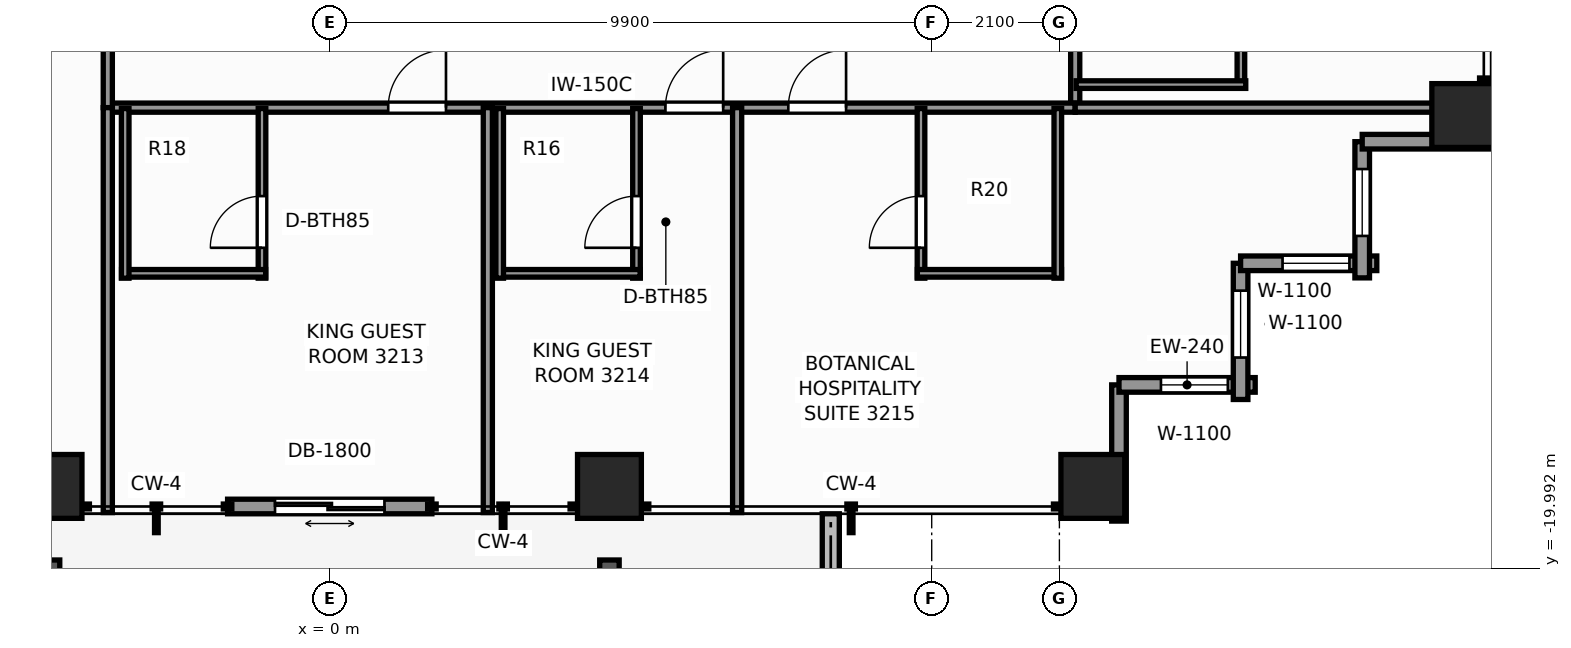
"""IFC4 building model, lengths in metres.
Left out: names, types, materials, properties, quantities, classifications, styles, units other than length and angle.
Written with IfcOpenShell. Run it as: python <this file> out.ifc"""

import sys

from ifc_helpers import new_model, si_unit, direction, frame, frame_2d, origin, origin_2d, place, context, subcontext, project, spatial, rectangle, extrude, element, fill, save


model = new_model("IFC4")
c1 = context("Model", 3, precision=1e-05, world=origin(), true_north=direction((0.0, 1.0)))
c2 = subcontext(c1, "Body", "Model", "MODEL_VIEW")
j1 = project(units=[si_unit("LENGTHUNIT", "METRE"), si_unit("PLANEANGLEUNIT", "RADIAN")], contexts=[c1])
p1 = place(None, origin())
s1 = spatial("IfcSite", under=j1, at=p1, CompositionType="ELEMENT")
p2 = place(p1, origin())
s2 = spatial("IfcBuilding", under=s1, at=p2, CompositionType="ELEMENT")
p3 = place(p2, frame((0.0, 0.0, 111.8)))
s3 = spatial("IfcBuildingStorey", under=s2, at=p3, CompositionType="ELEMENT", Elevation=111.8)
for number, where, z_axis, x_axis in (
    (1, (-4.6, -18.65, 0.0), (0.0, 0.0, 1.0), (1.0, 0.0, 0.0)),
    (2, (4.6, -18.65, 0.0), (0.0, 0.0, 1.0), (1.0, 0.0, 0.0)),
    (3, (12.55, -18.65, 0.0), (0.0, 0.0, 1.0), (1.0, 0.0, 0.0)),
    (4, (18.65, -12.55, 0.0), (0.0, 0.0, 1.0), (1.0, 0.0, 0.0)),
):
    element("IfcColumn", number, at=place(p3, frame(where, z_axis=z_axis, x_axis=x_axis)), inside=s3, PredefinedType="COLUMN", context=c2, shape_type="SweptSolid", body=[
        extrude(rectangle(XDim=1.05, YDim=1.05, at=origin_2d()), origin(), (0.0, 0.0, 1.0), 3.3),
    ])
p4 = place(p3, frame((8.24, -21.774, -0.04), z_axis=(0.0, 0.0, 1.0), x_axis=(0.0, 1.0, 0.0)))
e5 = element("IfcWall", 5, at=p4, inside=s3, PredefinedType="PARAPET", context=c2, shape_type="SweptSolid", body=[
    extrude(rectangle(XDim=2.674, YDim=0.28, at=frame_2d((1.337, 0.0))), origin(), (0.0, 0.0, 1.0), 0.42),
])
p5 = place(p3, frame((1.68, -18.98, 0.0), z_axis=(0.0, 0.0, 1.0), x_axis=(-1.0, 0.0, 0.0)))
e6 = element("IfcWall", 6, at=p5, inside=s3, PredefinedType="STANDARD", context=c2, shape_type="SweptSolid", body=[
    extrude(rectangle(XDim=3.36, YDim=0.24, at=frame_2d((1.68, 0.0))), origin(), (0.0, 0.0, 1.0), 3.08),
])
p6 = place(p5, frame((0.78, 0.0, 0.0)))
e7 = element("IfcOpeningElement", 7, at=p6, cuts=e6, PredefinedType="OPENING", context=c2, shape_type="SweptSolid", body=[
    extrude(rectangle(XDim=1.8, YDim=2.2, at=frame_2d((0.9, 1.1))), frame((0.0, 0.13, 0.0), z_axis=(0.0, -1.0, 0.0), x_axis=(1.0, 0.0, 0.0)), (0.0, 0.0, 1.0), 0.26),
])
p7 = place(p3, frame((12.98, -16.98, 0.0), z_axis=(0.0, 0.0, 1.0), x_axis=(0.0, -1.0, 0.0)))
e8 = element("IfcWall", 8, at=p7, inside=s3, PredefinedType="STANDARD", context=c2, shape_type="SweptSolid", body=[
    extrude(rectangle(XDim=2.24, YDim=0.24, at=frame_2d((1.12, 0.0))), origin(), (0.0, 0.0, 1.0), 2.459),
])
p8 = place(p3, frame((15.22, -16.98, 0.0), z_axis=(0.0, 0.0, 1.0), x_axis=(-1.0, 0.0, 0.0)))
e9 = element("IfcWall", 9, at=p8, inside=s3, PredefinedType="STANDARD", context=c2, shape_type="SweptSolid", body=[
    extrude(rectangle(XDim=2.24, YDim=0.24, at=frame_2d((1.12, 0.0))), origin(), (0.0, 0.0, 1.0), 2.459),
])
p9 = place(p8, frame((0.45, 0.0, 0.65)))
e10 = element("IfcOpeningElement", 10, at=p9, cuts=e9, PredefinedType="OPENING", context=c2, shape_type="SweptSolid", body=[
    extrude(rectangle(XDim=1.1, YDim=1.45, at=frame_2d((0.55, 0.725))), frame((0.0, 0.13, 0.0), z_axis=(0.0, -1.0, 0.0), x_axis=(1.0, 0.0, 0.0)), (0.0, 0.0, 1.0), 0.26),
])
p10 = place(p3, frame((14.98, -14.98, 0.0), z_axis=(0.0, 0.0, 1.0), x_axis=(0.0, -1.0, 0.0)))
e11 = element("IfcWall", 11, at=p10, inside=s3, PredefinedType="STANDARD", context=c2, shape_type="SweptSolid", body=[
    extrude(rectangle(XDim=2.24, YDim=0.24, at=frame_2d((1.12, 0.0))), origin(), (0.0, 0.0, 1.0), 2.459),
])
p11 = place(p10, frame((0.45, 0.0, 0.65)))
e12 = element("IfcOpeningElement", 12, at=p11, cuts=e11, PredefinedType="OPENING", context=c2, shape_type="SweptSolid", body=[
    extrude(rectangle(XDim=1.1, YDim=1.45, at=frame_2d((0.55, 0.725))), frame((0.0, 0.13, 0.0), z_axis=(0.0, -1.0, 0.0), x_axis=(1.0, 0.0, 0.0)), (0.0, 0.0, 1.0), 0.26),
])
p12 = place(p3, frame((17.22, -14.98, 0.0), z_axis=(0.0, 0.0, 1.0), x_axis=(-1.0, 0.0, 0.0)))
e13 = element("IfcWall", 13, at=p12, inside=s3, PredefinedType="STANDARD", context=c2, shape_type="SweptSolid", body=[
    extrude(rectangle(XDim=2.24, YDim=0.24, at=frame_2d((1.12, 0.0))), origin(), (0.0, 0.0, 1.0), 2.459),
])
p13 = place(p12, frame((0.45, 0.0, 0.65)))
e14 = element("IfcOpeningElement", 14, at=p13, cuts=e13, PredefinedType="OPENING", context=c2, shape_type="SweptSolid", body=[
    extrude(rectangle(XDim=1.1, YDim=1.45, at=frame_2d((0.55, 0.725))), frame((0.0, 0.13, 0.0), z_axis=(0.0, -1.0, 0.0), x_axis=(1.0, 0.0, 0.0)), (0.0, 0.0, 1.0), 0.26),
])
p14 = place(p3, frame((16.98, -12.98, 0.0), z_axis=(0.0, 0.0, 1.0), x_axis=(0.0, -1.0, 0.0)))
e15 = element("IfcWall", 15, at=p14, inside=s3, PredefinedType="STANDARD", context=c2, shape_type="SweptSolid", body=[
    extrude(rectangle(XDim=2.24, YDim=0.24, at=frame_2d((1.12, 0.0))), origin(), (0.0, 0.0, 1.0), 2.459),
])
p15 = place(p14, frame((0.45, 0.0, 0.65)))
e16 = element("IfcOpeningElement", 16, at=p15, cuts=e15, PredefinedType="OPENING", context=c2, shape_type="SweptSolid", body=[
    extrude(rectangle(XDim=1.1, YDim=1.45, at=frame_2d((0.55, 0.725))), frame((0.0, 0.13, 0.0), z_axis=(0.0, -1.0, 0.0), x_axis=(1.0, 0.0, 0.0)), (0.0, 0.0, 1.0), 0.26),
])
p16 = place(p3, frame((19.22, -12.98, 0.0), z_axis=(0.0, 0.0, 1.0), x_axis=(-1.0, 0.0, 0.0)))
e17 = element("IfcWall", 17, at=p16, inside=s3, PredefinedType="STANDARD", context=c2, shape_type="SweptSolid", body=[
    extrude(rectangle(XDim=2.24, YDim=0.24, at=frame_2d((1.12, 0.0))), origin(), (0.0, 0.0, 1.0), 2.459),
])
p17 = place(p3, frame((12.26, -12.42, 0.0), z_axis=(0.0, 0.0, 1.0), x_axis=(0.0, 1.0, 0.0)))
e18 = element("IfcWall", 18, at=p17, inside=s3, PredefinedType="PARTITIONING", context=c2, shape_type="SweptSolid", body=[
    extrude(rectangle(XDim=24.84, YDim=0.15, at=frame_2d((12.42, 0.0))), origin(), (0.0, 0.0, 1.0), 2.292),
])
p18 = place(p17, frame((3.373, 0.0, 0.0)))
e19 = element("IfcOpeningElement", 19, at=p18, cuts=e18, PredefinedType="OPENING", context=c2, shape_type="SweptSolid", body=[
    extrude(rectangle(XDim=0.95, YDim=2.06, at=frame_2d((0.475, 1.03))), frame((0.0, 0.085, 0.0), z_axis=(0.0, -1.0, 0.0), x_axis=(1.0, 0.0, 0.0)), (0.0, 0.0, 1.0), 0.17),
])
p19 = place(p17, frame((5.593, 0.0, 0.0)))
e20 = element("IfcOpeningElement", 20, at=p19, cuts=e18, PredefinedType="OPENING", context=c2, shape_type="SweptSolid", body=[
    extrude(rectangle(XDim=0.95, YDim=2.06, at=frame_2d((0.475, 1.03))), frame((0.0, 0.085, 0.0), z_axis=(0.0, -1.0, 0.0), x_axis=(1.0, 0.0, 0.0)), (0.0, 0.0, 1.0), 0.17),
])
p20 = place(p17, frame((13.981, 0.0, 0.0)))
e21 = element("IfcOpeningElement", 21, at=p20, cuts=e18, PredefinedType="OPENING", context=c2, shape_type="SweptSolid", body=[
    extrude(rectangle(XDim=0.95, YDim=2.06, at=frame_2d((0.475, 1.03))), frame((0.0, 0.085, 0.0), z_axis=(0.0, -1.0, 0.0), x_axis=(1.0, 0.0, 0.0)), (0.0, 0.0, 1.0), 0.17),
])
p21 = place(p17, frame((16.886, 0.0, 0.0)))
e22 = element("IfcOpeningElement", 22, at=p21, cuts=e18, PredefinedType="OPENING", context=c2, shape_type="SweptSolid", body=[
    extrude(rectangle(XDim=0.9, YDim=2.06, at=frame_2d((0.45, 1.03))), frame((0.0, 0.085, 0.0), z_axis=(0.0, -1.0, 0.0), x_axis=(1.0, 0.0, 0.0)), (0.0, 0.0, 1.0), 0.17),
])
p22 = place(p17, frame((20.0, 0.0, 0.0)))
e23 = element("IfcOpeningElement", 23, at=p22, cuts=e18, PredefinedType="OPENING", context=c2, shape_type="SweptSolid", body=[
    extrude(rectangle(XDim=0.95, YDim=2.06, at=frame_2d((0.475, 1.03))), frame((0.0, 0.085, 0.0), z_axis=(0.0, -1.0, 0.0), x_axis=(1.0, 0.0, 0.0)), (0.0, 0.0, 1.0), 0.17),
])
p23 = place(p3, frame((-3.65, -12.42, 0.0), z_axis=(0.0, 0.0, 1.0), x_axis=(1.0, 0.0, 0.0)))
e24 = element("IfcWall", 24, at=p23, inside=s3, PredefinedType="PARTITIONING", context=c2, shape_type="SweptSolid", body=[
    extrude(rectangle(XDim=15.91, YDim=0.15, at=frame_2d((7.955, 0.0))), origin(), (0.0, 0.0, 1.0), 2.292),
])
p24 = place(p23, frame((4.612, 0.0, 0.0)))
e25 = element("IfcOpeningElement", 25, at=p24, cuts=e24, PredefinedType="OPENING", context=c2, shape_type="SweptSolid", body=[
    extrude(rectangle(XDim=0.95, YDim=2.06, at=frame_2d((0.475, 1.03))), frame((0.0, 0.085, 0.0), z_axis=(0.0, -1.0, 0.0), x_axis=(1.0, 0.0, 0.0)), (0.0, 0.0, 1.0), 0.17),
])
p25 = place(p23, frame((9.17, 0.0, 0.0)))
e26 = element("IfcOpeningElement", 26, at=p25, cuts=e24, PredefinedType="OPENING", context=c2, shape_type="SweptSolid", body=[
    extrude(rectangle(XDim=0.95, YDim=2.06, at=frame_2d((0.475, 1.03))), frame((0.0, 0.085, 0.0), z_axis=(0.0, -1.0, 0.0), x_axis=(1.0, 0.0, 0.0)), (0.0, 0.0, 1.0), 0.17),
])
p26 = place(p23, frame((11.192, 0.0, 0.0)))
e27 = element("IfcOpeningElement", 27, at=p26, cuts=e24, PredefinedType="OPENING", context=c2, shape_type="SweptSolid", body=[
    extrude(rectangle(XDim=0.95, YDim=2.06, at=frame_2d((0.475, 1.03))), frame((0.0, 0.085, 0.0), z_axis=(0.0, -1.0, 0.0), x_axis=(1.0, 0.0, 0.0)), (0.0, 0.0, 1.0), 0.17),
])
p27 = place(p3, frame((-3.65, -12.42, 0.0), z_axis=(0.0, 0.0, 1.0), x_axis=(0.0, 1.0, 0.0)))
e28 = element("IfcWall", 28, at=p27, inside=s3, PredefinedType="PARTITIONING", context=c2, shape_type="SweptSolid", body=[
    extrude(rectangle(XDim=2.52, YDim=0.15, at=frame_2d((1.26, 0.0))), origin(), (0.0, 0.0, 1.0), 3.08),
])
p28 = place(p3, frame((12.26, -12.42, 0.0), z_axis=(0.0, 0.0, 1.0), x_axis=(1.0, 0.0, 0.0)))
e29 = element("IfcWall", 29, at=p28, inside=s3, PredefinedType="PARTITIONING", context=c2, shape_type="SweptSolid", body=[
    extrude(rectangle(XDim=6.82, YDim=0.15, at=frame_2d((3.41, 0.0))), origin(), (0.0, 0.0, 1.0), 2.292),
])
p29 = place(p3, frame((14.985, -12.101, 0.0), z_axis=(0.0, 0.0, 1.0), x_axis=(0.0, 1.0, 0.0)))
e30 = element("IfcWall", 30, at=p29, inside=s3, PredefinedType="PARTITIONING", context=c2, shape_type="SweptSolid", body=[
    extrude(rectangle(XDim=2.37, YDim=0.125, at=frame_2d((1.185, 0.0))), origin(), (0.0, 0.0, 1.0), 2.292),
])
p30 = place(p3, frame((12.275, -12.041, 0.0), z_axis=(0.0, 0.0, 1.0), x_axis=(1.0, 0.0, 0.0)))
e31 = element("IfcWall", 31, at=p30, inside=s3, PredefinedType="PARTITIONING", context=c2, shape_type="SweptSolid", body=[
    extrude(rectangle(XDim=2.79, YDim=0.125, at=frame_2d((1.395, 0.0))), origin(), (0.0, 0.0, 1.0), 3.08),
])
for number, where, z_axis, x_axis in (
    (32, (-3.65, -19.08, 0.0), (0.0, 0.0, 1.0), (0.0, 1.0, 0.0)),
    (33, (2.6, -19.08, 0.0), (0.0, 0.0, 1.0), (0.0, 1.0, 0.0)),
):
    element("IfcWall", number, at=place(p3, frame(where, z_axis=z_axis, x_axis=x_axis)), inside=s3, PredefinedType="PARTITIONING", context=c2, shape_type="SweptSolid", body=[
        extrude(rectangle(XDim=6.66, YDim=0.15, at=frame_2d((3.33, 0.0))), origin(), (0.0, 0.0, 1.0), 2.449),
    ])
p31 = place(p3, frame((-1.114, -15.225, 0.0), z_axis=(0.0, 0.0, 1.0), x_axis=(0.0, 1.0, 0.0)))
e34 = element("IfcWall", 34, at=p31, inside=s3, PredefinedType="PARTITIONING", context=c2, shape_type="SweptSolid", body=[
    extrude(rectangle(XDim=2.79, YDim=0.125, at=frame_2d((1.395, 0.0))), origin(), (0.0, 0.0, 1.0), 3.08),
])
p32 = place(p31, frame((0.5, 0.0, 0.0)))
e35 = element("IfcOpeningElement", 35, at=p32, cuts=e34, PredefinedType="OPENING", context=c2, shape_type="SweptSolid", body=[
    extrude(rectangle(XDim=0.85, YDim=2.03, at=frame_2d((0.425, 1.015))), frame((0.0, 0.073, 0.0), z_axis=(0.0, -1.0, 0.0), x_axis=(1.0, 0.0, 0.0)), (0.0, 0.0, 1.0), 0.145),
])
p33 = place(p3, frame((-3.424, -15.145, 0.0), z_axis=(0.0, 0.0, 1.0), x_axis=(1.0, 0.0, 0.0)))
e36 = element("IfcWall", 36, at=p33, inside=s3, PredefinedType="PARTITIONING", context=c2, shape_type="SweptSolid", body=[
    extrude(rectangle(XDim=2.37, YDim=0.125, at=frame_2d((1.185, 0.0))), origin(), (0.0, 0.0, 1.0), 3.08),
])
p34 = place(p3, frame((-3.364, -15.225, 0.0), z_axis=(0.0, 0.0, 1.0), x_axis=(0.0, 1.0, 0.0)))
e37 = element("IfcWall", 37, at=p34, inside=s3, PredefinedType="PARTITIONING", context=c2, shape_type="SweptSolid", body=[
    extrude(rectangle(XDim=2.79, YDim=0.125, at=frame_2d((1.395, 0.0))), origin(), (0.0, 0.0, 1.0), 3.08),
])
p35 = place(p3, frame((6.7, -19.08, 0.0), z_axis=(0.0, 0.0, 1.0), x_axis=(0.0, 1.0, 0.0)))
e38 = element("IfcWall", 38, at=p35, inside=s3, PredefinedType="PARTITIONING", context=c2, shape_type="SweptSolid", body=[
    extrude(rectangle(XDim=6.66, YDim=0.15, at=frame_2d((3.33, 0.0))), origin(), (0.0, 0.0, 1.0), 2.449),
])
p36 = place(p3, frame((5.045, -15.225, 0.0), z_axis=(0.0, 0.0, 1.0), x_axis=(0.0, 1.0, 0.0)))
e39 = element("IfcWall", 39, at=p36, inside=s3, PredefinedType="PARTITIONING", context=c2, shape_type="SweptSolid", body=[
    extrude(rectangle(XDim=2.79, YDim=0.125, at=frame_2d((1.395, 0.0))), origin(), (0.0, 0.0, 1.0), 3.08),
])
p37 = place(p36, frame((0.5, 0.0, 0.0)))
e40 = element("IfcOpeningElement", 40, at=p37, cuts=e39, PredefinedType="OPENING", context=c2, shape_type="SweptSolid", body=[
    extrude(rectangle(XDim=0.85, YDim=2.03, at=frame_2d((0.425, 1.015))), frame((0.0, 0.073, 0.0), z_axis=(0.0, -1.0, 0.0), x_axis=(1.0, 0.0, 0.0)), (0.0, 0.0, 1.0), 0.145),
])
p38 = place(p3, frame((2.735, -15.145, 0.0), z_axis=(0.0, 0.0, 1.0), x_axis=(1.0, 0.0, 0.0)))
e41 = element("IfcWall", 41, at=p38, inside=s3, PredefinedType="PARTITIONING", context=c2, shape_type="SweptSolid", body=[
    extrude(rectangle(XDim=2.37, YDim=0.125, at=frame_2d((1.185, 0.0))), origin(), (0.0, 0.0, 1.0), 2.292),
])
p39 = place(p3, frame((2.795, -15.225, 0.0), z_axis=(0.0, 0.0, 1.0), x_axis=(0.0, 1.0, 0.0)))
e42 = element("IfcWall", 42, at=p39, inside=s3, PredefinedType="PARTITIONING", context=c2, shape_type="SweptSolid", body=[
    extrude(rectangle(XDim=2.79, YDim=0.125, at=frame_2d((1.395, 0.0))), origin(), (0.0, 0.0, 1.0), 3.08),
])
p40 = place(p3, frame((9.724, -15.225, 0.0), z_axis=(0.0, 0.0, 1.0), x_axis=(0.0, 1.0, 0.0)))
e43 = element("IfcWall", 43, at=p40, inside=s3, PredefinedType="PARTITIONING", context=c2, shape_type="SweptSolid", body=[
    extrude(rectangle(XDim=2.79, YDim=0.125, at=frame_2d((1.395, 0.0))), origin(), (0.0, 0.0, 1.0), 3.08),
])
p41 = place(p40, frame((0.5, 0.0, 0.0)))
e44 = element("IfcOpeningElement", 44, at=p41, cuts=e43, PredefinedType="OPENING", context=c2, shape_type="SweptSolid", body=[
    extrude(rectangle(XDim=0.85, YDim=2.03, at=frame_2d((0.425, 1.015))), frame((0.0, 0.073, 0.0), z_axis=(0.0, -1.0, 0.0), x_axis=(1.0, 0.0, 0.0)), (0.0, 0.0, 1.0), 0.145),
])
p42 = place(p3, frame((9.664, -15.145, 0.0), z_axis=(0.0, 0.0, 1.0), x_axis=(1.0, 0.0, 0.0)))
e45 = element("IfcWall", 45, at=p42, inside=s3, PredefinedType="PARTITIONING", context=c2, shape_type="SweptSolid", body=[
    extrude(rectangle(XDim=2.37, YDim=0.125, at=frame_2d((1.185, 0.0))), origin(), (0.0, 0.0, 1.0), 2.292),
])
p43 = place(p3, frame((11.974, -15.225, 0.0), z_axis=(0.0, 0.0, 1.0), x_axis=(0.0, 1.0, 0.0)))
e46 = element("IfcWall", 46, at=p43, inside=s3, PredefinedType="PARTITIONING", context=c2, shape_type="SweptSolid", body=[
    extrude(rectangle(XDim=2.79, YDim=0.125, at=frame_2d((1.395, 0.0))), origin(), (0.0, 0.0, 1.0), 3.08),
])
p44 = place(p6, origin())
e47 = element("IfcDoor", 47, at=p44, inside=s3, OperationType="DOUBLE_DOOR_SLIDING", PredefinedType="DOOR", context=c2, shape_type="SweptSolid", body=[
    extrude(rectangle(XDim=1.8, YDim=2.2, at=frame_2d((0.9, 1.1))), frame((0.0, 0.025, 0.0), z_axis=(0.0, -1.0, 0.0), x_axis=(1.0, 0.0, 0.0)), (0.0, 0.0, 1.0), 0.05),
])
fill(e7, e47)
p45 = place(p9, origin())
e48 = element("IfcWindow", 48, at=p45, inside=s3, PartitioningType="SINGLE_PANEL", PredefinedType="WINDOW", context=c2, shape_type="SweptSolid", body=[
    extrude(rectangle(XDim=1.1, YDim=1.45, at=frame_2d((0.55, 0.725))), frame((0.0, 0.03, 0.0), z_axis=(0.0, -1.0, 0.0), x_axis=(1.0, 0.0, 0.0)), (0.0, 0.0, 1.0), 0.06),
])
fill(e10, e48)
p46 = place(p11, origin())
e49 = element("IfcWindow", 49, at=p46, inside=s3, PartitioningType="SINGLE_PANEL", PredefinedType="WINDOW", context=c2, shape_type="SweptSolid", body=[
    extrude(rectangle(XDim=1.1, YDim=1.45, at=frame_2d((0.55, 0.725))), frame((0.0, 0.03, 0.0), z_axis=(0.0, -1.0, 0.0), x_axis=(1.0, 0.0, 0.0)), (0.0, 0.0, 1.0), 0.06),
])
fill(e12, e49)
p47 = place(p13, origin())
e50 = element("IfcWindow", 50, at=p47, inside=s3, PartitioningType="SINGLE_PANEL", PredefinedType="WINDOW", context=c2, shape_type="SweptSolid", body=[
    extrude(rectangle(XDim=1.1, YDim=1.45, at=frame_2d((0.55, 0.725))), frame((0.0, 0.03, 0.0), z_axis=(0.0, -1.0, 0.0), x_axis=(1.0, 0.0, 0.0)), (0.0, 0.0, 1.0), 0.06),
])
fill(e14, e50)
p48 = place(p15, origin())
e51 = element("IfcWindow", 51, at=p48, inside=s3, PartitioningType="SINGLE_PANEL", PredefinedType="WINDOW", context=c2, shape_type="SweptSolid", body=[
    extrude(rectangle(XDim=1.1, YDim=1.45, at=frame_2d((0.55, 0.725))), frame((0.0, 0.03, 0.0), z_axis=(0.0, -1.0, 0.0), x_axis=(1.0, 0.0, 0.0)), (0.0, 0.0, 1.0), 0.06),
])
fill(e16, e51)
p49 = place(p32, origin())
e52 = element("IfcDoor", 52, at=p49, inside=s3, OperationType="SINGLE_SWING_LEFT", PredefinedType="DOOR", context=c2, shape_type="SweptSolid", body=[
    extrude(rectangle(XDim=0.85, YDim=2.03, at=frame_2d((0.425, 1.015))), frame((0.0, 0.025, 0.0), z_axis=(0.0, -1.0, 0.0), x_axis=(1.0, 0.0, 0.0)), (0.0, 0.0, 1.0), 0.05),
])
fill(e35, e52)
p50 = place(p24, origin())
e53 = element("IfcDoor", 53, at=p50, inside=s3, OperationType="SINGLE_SWING_RIGHT", PredefinedType="DOOR", context=c2, shape_type="SweptSolid", body=[
    extrude(rectangle(XDim=0.95, YDim=2.06, at=frame_2d((0.475, 1.03))), frame((0.0, 0.025, 0.0), z_axis=(0.0, -1.0, 0.0), x_axis=(1.0, 0.0, 0.0)), (0.0, 0.0, 1.0), 0.05),
])
fill(e25, e53)
p51 = place(p37, origin())
e54 = element("IfcDoor", 54, at=p51, inside=s3, OperationType="SINGLE_SWING_LEFT", PredefinedType="DOOR", context=c2, shape_type="SweptSolid", body=[
    extrude(rectangle(XDim=0.85, YDim=2.03, at=frame_2d((0.425, 1.015))), frame((0.0, 0.025, 0.0), z_axis=(0.0, -1.0, 0.0), x_axis=(1.0, 0.0, 0.0)), (0.0, 0.0, 1.0), 0.05),
])
fill(e40, e54)
p52 = place(p25, origin())
e55 = element("IfcDoor", 55, at=p52, inside=s3, OperationType="SINGLE_SWING_RIGHT", PredefinedType="DOOR", context=c2, shape_type="SweptSolid", body=[
    extrude(rectangle(XDim=0.95, YDim=2.06, at=frame_2d((0.475, 1.03))), frame((0.0, 0.025, 0.0), z_axis=(0.0, -1.0, 0.0), x_axis=(1.0, 0.0, 0.0)), (0.0, 0.0, 1.0), 0.05),
])
fill(e26, e55)
p53 = place(p41, origin())
e56 = element("IfcDoor", 56, at=p53, inside=s3, OperationType="SINGLE_SWING_LEFT", PredefinedType="DOOR", context=c2, shape_type="SweptSolid", body=[
    extrude(rectangle(XDim=0.85, YDim=2.03, at=frame_2d((0.425, 1.015))), frame((0.0, 0.025, 0.0), z_axis=(0.0, -1.0, 0.0), x_axis=(1.0, 0.0, 0.0)), (0.0, 0.0, 1.0), 0.05),
])
fill(e44, e56)
p54 = place(p26, origin())
e57 = element("IfcDoor", 57, at=p54, inside=s3, OperationType="SINGLE_SWING_RIGHT", PredefinedType="DOOR", context=c2, shape_type="SweptSolid", body=[
    extrude(rectangle(XDim=0.95, YDim=2.06, at=frame_2d((0.475, 1.03))), frame((0.0, 0.025, 0.0), z_axis=(0.0, -1.0, 0.0), x_axis=(1.0, 0.0, 0.0)), (0.0, 0.0, 1.0), 0.05),
])
fill(e27, e57)
save(model, sys.argv[1])
